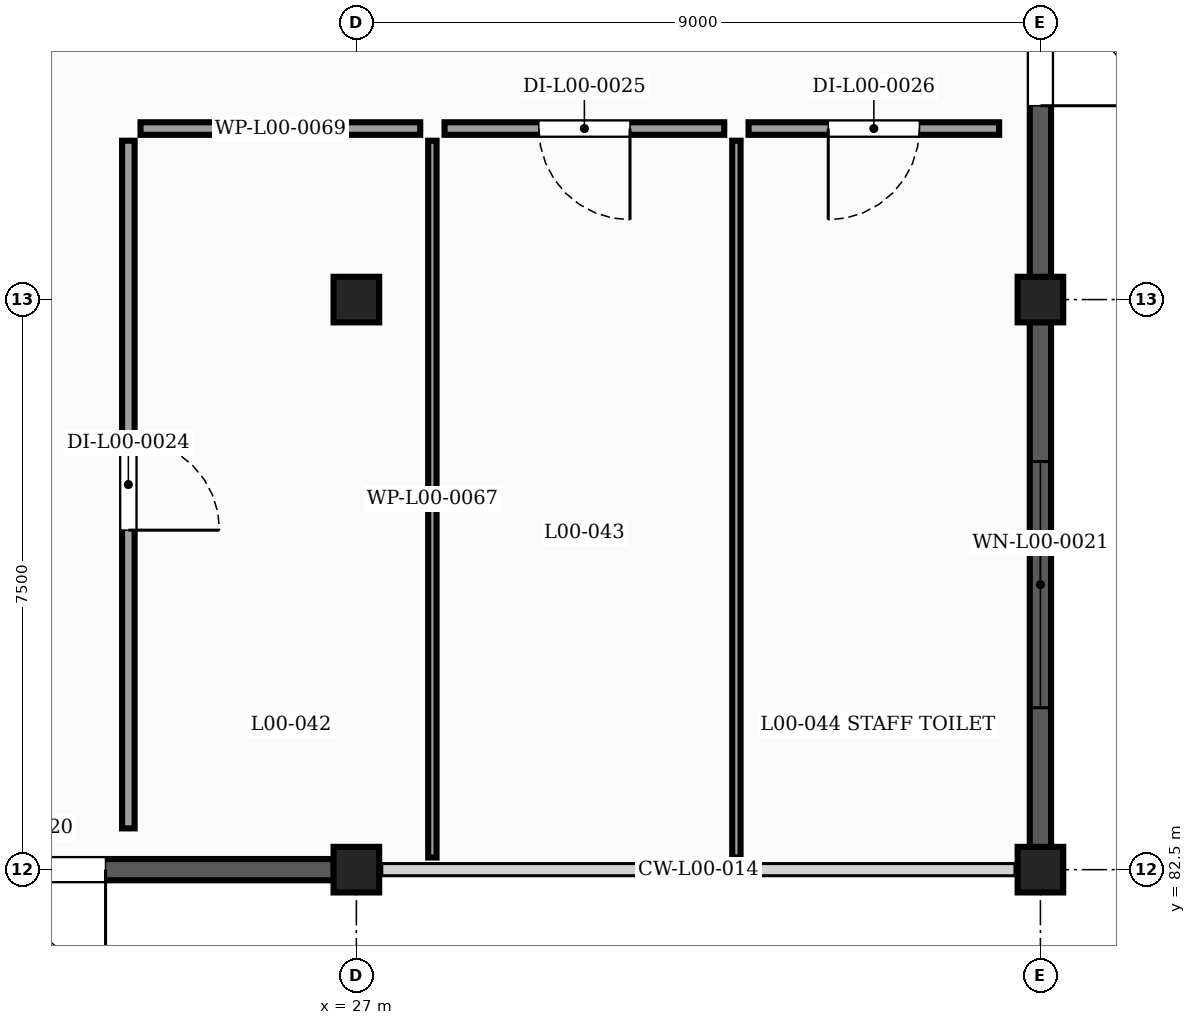
"""IFC4 building model, lengths in metres.
Left out: names, types, materials, properties, quantities, classifications, styles, units other than length and angle.
Written with IfcOpenShell. Run it as: python <this file> out.ifc"""

import sys

from ifc_helpers import new_model, si_unit, direction, frame, frame_2d, origin, origin_2d, place, context, subcontext, project, spatial, rectangle, extrude, element, fill, save


model = new_model("IFC4")
c1 = context("Model", 3, precision=1e-05, world=origin(), true_north=direction((0.0, 1.0)))
c2 = subcontext(c1, "Body", "Model", "MODEL_VIEW")
j1 = project(units=[si_unit("LENGTHUNIT", "METRE"), si_unit("PLANEANGLEUNIT", "RADIAN")], contexts=[c1])
p1 = place(None, origin())
s1 = spatial("IfcSite", under=j1, at=p1, CompositionType="ELEMENT")
p2 = place(p1, origin())
s2 = spatial("IfcBuilding", under=s1, at=p2, CompositionType="ELEMENT")
p3 = place(p2, origin())
s3 = spatial("IfcBuildingStorey", under=s2, at=p3, CompositionType="ELEMENT", Elevation=0.0)
for number, where, z_axis, x_axis in (
    (1, (27.0, 82.5, -0.25), (0.0, 0.0, 1.0), (1.0, 0.0, 0.0)),
    (2, (36.0, 82.5, -0.25), (0.0, 0.0, 1.0), (1.0, 0.0, 0.0)),
    (3, (27.0, 90.0, -0.25), (0.0, 0.0, 1.0), (1.0, 0.0, 0.0)),
    (4, (36.0, 90.0, -0.25), (0.0, 0.0, 1.0), (1.0, 0.0, 0.0)),
):
    element("IfcColumn", number, at=place(p3, frame(where, z_axis=z_axis, x_axis=x_axis)), inside=s3, PredefinedType="COLUMN", context=c2, shape_type="SweptSolid", body=[
        extrude(rectangle(XDim=0.6, YDim=0.6, at=origin_2d()), origin(), (0.0, 0.0, 1.0), 4.75),
    ])
p4 = place(p3, frame((36.0, 97.204, 0.0), z_axis=(0.0, 0.0, 1.0), x_axis=(0.0, -1.0, 0.0)))
e5 = element("IfcWall", 5, at=p4, inside=s3, PredefinedType="SOLIDWALL", context=c2, shape_type="SweptSolid", body=[
    extrude(rectangle(XDim=6.908, YDim=0.28, at=frame_2d((3.454, 0.0))), origin(), (0.0, 0.0, 1.0), 3.442),
])
p5 = place(p4, frame((2.254, 0.0, 0.0)))
e6 = element("IfcOpeningElement", 6, at=p5, cuts=e5, PredefinedType="OPENING", context=c2, shape_type="SweptSolid", body=[
    extrude(rectangle(XDim=2.4, YDim=2.25, at=frame_2d((1.2, 1.125))), frame((0.0, 0.15, 0.0), z_axis=(0.0, -1.0, 0.0), x_axis=(1.0, 0.0, 0.0)), (0.0, 0.0, 1.0), 0.3),
])
p6 = place(p3, frame((36.0, 89.704, 0.0), z_axis=(0.0, 0.0, 1.0), x_axis=(0.0, -1.0, 0.0)))
e7 = element("IfcWall", 7, at=p6, inside=s3, PredefinedType="SOLIDWALL", context=c2, shape_type="SweptSolid", body=[
    extrude(rectangle(XDim=6.908, YDim=0.28, at=frame_2d((3.454, 0.0))), origin(), (0.0, 0.0, 1.0), 3.442),
])
p7 = place(p6, frame((1.834, 0.0, 0.95)))
e8 = element("IfcOpeningElement", 8, at=p7, cuts=e7, PredefinedType="OPENING", context=c2, shape_type="SweptSolid", body=[
    extrude(rectangle(XDim=3.24, YDim=1.3, at=frame_2d((1.62, 0.65))), frame((0.0, 0.15, 0.0), z_axis=(0.0, -1.0, 0.0), x_axis=(1.0, 0.0, 0.0)), (0.0, 0.0, 1.0), 0.3),
])
p8 = place(p3, frame((26.704, 82.5, 0.0), z_axis=(0.0, 0.0, 1.0), x_axis=(-1.0, 0.0, 0.0)))
e9 = element("IfcWall", 9, at=p8, inside=s3, PredefinedType="SOLIDWALL", context=c2, shape_type="SweptSolid", body=[
    extrude(rectangle(XDim=8.408, YDim=0.28, at=frame_2d((4.204, 0.0))), origin(), (0.0, 0.0, 1.0), 3.442),
])
p9 = place(p8, frame((3.004, 0.0, 0.0)))
e10 = element("IfcOpeningElement", 10, at=p9, cuts=e9, PredefinedType="OPENING", context=c2, shape_type="SweptSolid", body=[
    extrude(rectangle(XDim=2.4, YDim=2.25, at=frame_2d((1.2, 1.125))), frame((0.0, 0.15, 0.0), z_axis=(0.0, -1.0, 0.0), x_axis=(1.0, 0.0, 0.0)), (0.0, 0.0, 1.0), 0.3),
])
p10 = place(p3, frame((28.0, 82.66, 0.0), z_axis=(0.0, 0.0, 1.0), x_axis=(0.0, 1.0, 0.0)))
e11 = element("IfcWall", 11, at=p10, inside=s3, PredefinedType="PARTITIONING", context=c2, shape_type="SweptSolid", body=[
    extrude(rectangle(XDim=9.43, YDim=0.11, at=frame_2d((4.715, 0.0))), origin(), (0.0, 0.0, 1.0), 4.1),
])
p11 = place(p3, frame((24.0, 92.09, 0.0), z_axis=(0.0, 0.0, 1.0), x_axis=(0.0, -1.0, 0.0)))
e12 = element("IfcWall", 12, at=p11, inside=s3, PredefinedType="PARTITIONING", context=c2, shape_type="SweptSolid", body=[
    extrude(rectangle(XDim=9.047, YDim=0.165, at=frame_2d((4.523, 0.0))), origin(), (0.0, 0.0, 1.0), 3.642),
])
p12 = place(p11, frame((3.924, 0.0, 0.0)))
e13 = element("IfcOpeningElement", 13, at=p12, cuts=e12, PredefinedType="OPENING", context=c2, shape_type="SweptSolid", body=[
    extrude(rectangle(XDim=1.2, YDim=2.15, at=frame_2d((0.6, 1.075))), frame((0.0, 0.093, 0.0), z_axis=(0.0, -1.0, 0.0), x_axis=(1.0, 0.0, 0.0)), (0.0, 0.0, 1.0), 0.185),
])
p13 = place(p3, frame((27.84, 92.25, 0.0), z_axis=(0.0, 0.0, 1.0), x_axis=(-1.0, 0.0, 0.0)))
e14 = element("IfcWall", 14, at=p13, inside=s3, PredefinedType="PARTITIONING", context=c2, shape_type="SweptSolid", body=[
    extrude(rectangle(XDim=3.68, YDim=0.165, at=frame_2d((1.84, 0.0))), origin(), (0.0, 0.0, 1.0), 4.1),
])
p14 = place(p3, frame((32.0, 82.66, 0.0), z_axis=(0.0, 0.0, 1.0), x_axis=(0.0, 1.0, 0.0)))
e15 = element("IfcWall", 15, at=p14, inside=s3, PredefinedType="PARTITIONING", context=c2, shape_type="SweptSolid", body=[
    extrude(rectangle(XDim=9.43, YDim=0.11, at=frame_2d((4.715, 0.0))), origin(), (0.0, 0.0, 1.0), 4.1),
])
p15 = place(p3, frame((31.84, 92.25, 0.0), z_axis=(0.0, 0.0, 1.0), x_axis=(-1.0, 0.0, 0.0)))
e16 = element("IfcWall", 16, at=p15, inside=s3, PredefinedType="PARTITIONING", context=c2, shape_type="SweptSolid", body=[
    extrude(rectangle(XDim=3.68, YDim=0.165, at=frame_2d((1.84, 0.0))), origin(), (0.0, 0.0, 1.0), 4.1),
])
p16 = place(p15, frame((1.24, 0.0, 0.0)))
e17 = element("IfcOpeningElement", 17, at=p16, cuts=e16, PredefinedType="OPENING", context=c2, shape_type="SweptSolid", body=[
    extrude(rectangle(XDim=1.2, YDim=2.15, at=frame_2d((0.6, 1.075))), frame((0.0, 0.093, 0.0), z_axis=(0.0, -1.0, 0.0), x_axis=(1.0, 0.0, 0.0)), (0.0, 0.0, 1.0), 0.185),
])
p17 = place(p3, frame((35.457, 92.25, 0.0), z_axis=(0.0, 0.0, 1.0), x_axis=(-1.0, 0.0, 0.0)))
e18 = element("IfcWall", 18, at=p17, inside=s3, PredefinedType="PARTITIONING", context=c2, shape_type="SweptSolid", body=[
    extrude(rectangle(XDim=3.297, YDim=0.165, at=frame_2d((1.648, 0.0))), origin(), (0.0, 0.0, 1.0), 4.1),
])
p18 = place(p17, frame((1.049, 0.0, 0.0)))
e19 = element("IfcOpeningElement", 19, at=p18, cuts=e18, PredefinedType="OPENING", context=c2, shape_type="SweptSolid", body=[
    extrude(rectangle(XDim=1.2, YDim=2.15, at=frame_2d((0.6, 1.075))), frame((0.0, 0.093, 0.0), z_axis=(0.0, -1.0, 0.0), x_axis=(1.0, 0.0, 0.0)), (0.0, 0.0, 1.0), 0.185),
])
p19 = place(p5, origin())
e20 = element("IfcDoor", 20, at=p19, inside=s3, OperationType="DOUBLE_DOOR_SINGLE_SWING", PredefinedType="DOOR", context=c2, shape_type="SweptSolid", body=[
    extrude(rectangle(XDim=2.4, YDim=2.25, at=frame_2d((1.2, 1.125))), frame((0.0, 0.025, 0.0), z_axis=(0.0, -1.0, 0.0), x_axis=(1.0, 0.0, 0.0)), (0.0, 0.0, 1.0), 0.05),
])
fill(e6, e20)
p20 = place(p7, origin())
e21 = element("IfcWindow", 21, at=p20, inside=s3, PartitioningType="DOUBLE_PANEL_VERTICAL", PredefinedType="WINDOW", context=c2, shape_type="SweptSolid", body=[
    extrude(rectangle(XDim=3.24, YDim=1.3, at=frame_2d((1.62, 0.65))), frame((0.0, 0.03, 0.0), z_axis=(0.0, -1.0, 0.0), x_axis=(1.0, 0.0, 0.0)), (0.0, 0.0, 1.0), 0.06),
])
fill(e8, e21)
p21 = place(p9, origin())
e22 = element("IfcDoor", 22, at=p21, inside=s3, OperationType="DOUBLE_DOOR_SINGLE_SWING", PredefinedType="DOOR", context=c2, shape_type="SweptSolid", body=[
    extrude(rectangle(XDim=2.4, YDim=2.25, at=frame_2d((1.2, 1.125))), frame((0.0, 0.025, 0.0), z_axis=(0.0, -1.0, 0.0), x_axis=(1.0, 0.0, 0.0)), (0.0, 0.0, 1.0), 0.05),
])
fill(e10, e22)
p22 = place(p12, origin())
e23 = element("IfcDoor", 23, at=p22, inside=s3, OperationType="SINGLE_SWING_RIGHT", PredefinedType="DOOR", context=c2, shape_type="SweptSolid", body=[
    extrude(rectangle(XDim=1.2, YDim=2.15, at=frame_2d((0.6, 1.075))), frame((0.0, 0.025, 0.0), z_axis=(0.0, -1.0, 0.0), x_axis=(1.0, 0.0, 0.0)), (0.0, 0.0, 1.0), 0.05),
])
fill(e13, e23)
p23 = place(p16, origin())
e24 = element("IfcDoor", 24, at=p23, inside=s3, OperationType="SINGLE_SWING_LEFT", PredefinedType="DOOR", context=c2, shape_type="SweptSolid", body=[
    extrude(rectangle(XDim=1.2, YDim=2.15, at=frame_2d((0.6, 1.075))), frame((0.0, 0.025, 0.0), z_axis=(0.0, -1.0, 0.0), x_axis=(1.0, 0.0, 0.0)), (0.0, 0.0, 1.0), 0.05),
])
fill(e17, e24)
p24 = place(p18, origin())
e25 = element("IfcDoor", 25, at=p24, inside=s3, OperationType="SINGLE_SWING_RIGHT", PredefinedType="DOOR", context=c2, shape_type="SweptSolid", body=[
    extrude(rectangle(XDim=1.2, YDim=2.15, at=frame_2d((0.6, 1.075))), frame((0.0, 0.025, 0.0), z_axis=(0.0, -1.0, 0.0), x_axis=(1.0, 0.0, 0.0)), (0.0, 0.0, 1.0), 0.05),
])
fill(e19, e25)
save(model, sys.argv[1])
